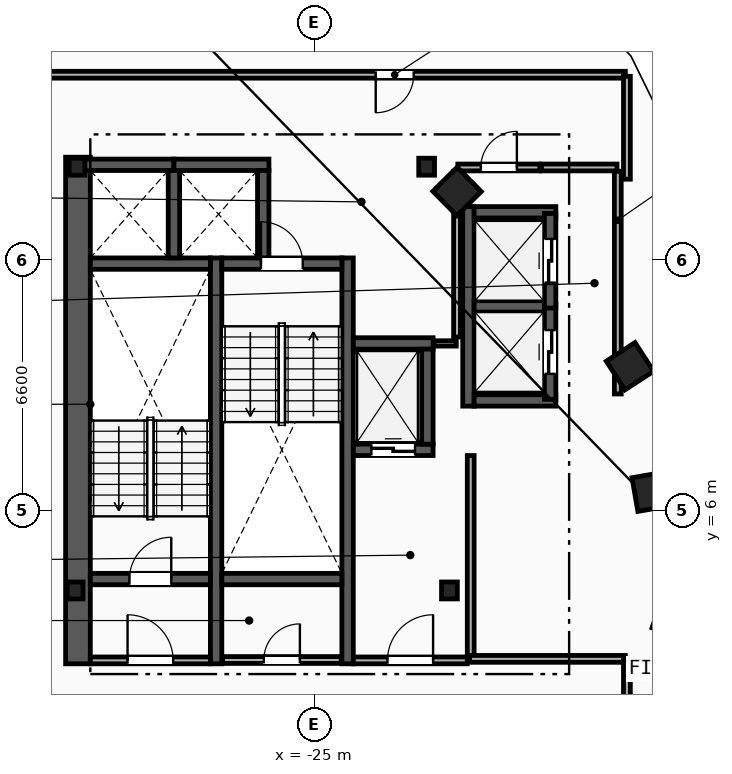
"""IFC4 building model, lengths in metres.
Left out: names, types, materials, properties, quantities, classifications, styles, units other than length and angle.
Written with IfcOpenShell. Run it as: python <this file> out.ifc"""

import sys

from ifc_helpers import new_model, si_unit, direction, frame, frame_2d, origin, origin_2d, place, context, subcontext, project, spatial, rectangle, i_section, extrude, element, fill, save


model = new_model("IFC4")
c1 = context("Model", 3, precision=1e-05, world=origin(), true_north=direction((0.0, 1.0)))
c2 = subcontext(c1, "Body", "Model", "MODEL_VIEW")
j1 = project(units=[si_unit("LENGTHUNIT", "METRE"), si_unit("PLANEANGLEUNIT", "RADIAN")], contexts=[c1])
p1 = place(None, origin())
s1 = spatial("IfcSite", under=j1, at=p1, CompositionType="ELEMENT")
p2 = place(p1, origin())
s2 = spatial("IfcBuilding", under=s1, at=p2, CompositionType="ELEMENT")
p3 = place(p2, frame((0.0, 0.0, 217.0)))
s3 = spatial("IfcBuildingStorey", under=s2, at=p3, CompositionType="ELEMENT", Elevation=217.0)
for number, where, z_axis, x_axis in (
    (1, (-31.3, 3.9, 0.0), (0.0, 0.0, 1.0), (1.0, 0.0, 0.0)),
    (2, (-21.45, 3.9, 0.0), (0.0, 0.0, 1.0), (1.0, 0.0, 0.0)),
    (3, (-22.05, 15.05, 0.0), (0.0, 0.0, 1.0), (1.0, 0.0, 0.0)),
    (4, (-31.25, 15.05, 0.0), (0.0, 0.0, 1.0), (1.0, 0.0, 0.0)),
):
    element("IfcColumn", number, at=place(p3, frame(where, z_axis=z_axis, x_axis=x_axis)), inside=s3, PredefinedType="COLUMN", context=c2, shape_type="SweptSolid", body=[
        extrude(i_section(OverallWidth=0.416, OverallDepth=0.446, WebThickness=0.039, FlangeThickness=0.063, FilletRadius=0.018, at=origin_2d()), origin(), (0.0, 0.0, 1.0), 3.6),
    ])
for number, where, z_axis, x_axis in (
    (5, (-15.55, 3.2, 0.0), (0.0, 0.0, 1.0), (0.315, 0.949, 0.0)),
    (6, (-16.125, 6.5, 0.0), (0.0, 0.0, 1.0), (-0.172, 0.985, 0.0)),
    (7, (-16.7, 9.8, 0.0), (0.0, 0.0, 1.0), (-0.544, 0.839, 0.0)),
    (8, (-21.25, 14.4, 0.0), (0.0, 0.0, 1.0), (-0.703, 0.711, 0.0)),
):
    element("IfcColumn", number, at=place(p3, frame(where, z_axis=z_axis, x_axis=x_axis)), inside=s3, PredefinedType="COLUMN", context=c2, shape_type="SweptSolid", body=[
        extrude(rectangle(XDim=0.9, YDim=0.9, at=origin_2d()), origin(), (0.0, 0.0, 1.0), 3.6),
    ])
p4 = place(p3, frame((-31.225, 1.97, 0.0), z_axis=(0.0, 0.0, 1.0), x_axis=(0.0, 1.0, 0.0)))
e9 = element("IfcWall", 9, at=p4, inside=s3, PredefinedType="SHEAR", context=c2, shape_type="SweptSolid", body=[
    extrude(rectangle(XDim=13.33, YDim=0.65, at=frame_2d((6.665, 0.0))), origin(), (0.0, 0.0, 1.0), 3.34),
])
for number, where, z_axis, x_axis in (
    (10, (-27.59, 1.97, 0.0), (0.0, 0.0, 1.0), (0.0, 1.0, 0.0)),
    (11, (-24.13, 1.97, 0.0), (0.0, 0.0, 1.0), (0.0, 1.0, 0.0)),
):
    element("IfcWall", number, at=place(p3, frame(where, z_axis=z_axis, x_axis=x_axis)), inside=s3, PredefinedType="SHEAR", context=c2, shape_type="SweptSolid", body=[
        extrude(rectangle(XDim=10.68, YDim=0.3, at=frame_2d((5.34, 0.0))), origin(), (0.0, 0.0, 1.0), 3.34),
    ])
p5 = place(p3, frame((-30.9, 4.2, 0.0), z_axis=(0.0, 0.0, 1.0), x_axis=(1.0, 0.0, 0.0)))
e12 = element("IfcWall", 12, at=p5, inside=s3, PredefinedType="SHEAR", context=c2, shape_type="SweptSolid", body=[
    extrude(rectangle(XDim=3.16, YDim=0.3, at=frame_2d((1.58, 0.0))), origin(), (0.0, 0.0, 1.0), 3.34),
])
p6 = place(p5, frame((1.03, 0.0, 0.0)))
e13 = element("IfcOpeningElement", 13, at=p6, cuts=e12, PredefinedType="OPENING", context=c2, shape_type="SweptSolid", body=[
    extrude(rectangle(XDim=1.1, YDim=2.15, at=frame_2d((0.55, 1.075))), frame((0.0, 0.16, 0.0), z_axis=(0.0, -1.0, 0.0), x_axis=(1.0, 0.0, 0.0)), (0.0, 0.0, 1.0), 0.32),
])
p7 = place(p3, frame((-30.9, 12.5, 0.0), z_axis=(0.0, 0.0, 1.0), x_axis=(1.0, 0.0, 0.0)))
e14 = element("IfcWall", 14, at=p7, inside=s3, PredefinedType="SHEAR", context=c2, shape_type="SweptSolid", body=[
    extrude(rectangle(XDim=3.16, YDim=0.3, at=frame_2d((1.58, 0.0))), origin(), (0.0, 0.0, 1.0), 3.34),
])
p8 = place(p3, frame((-27.44, 12.5, 0.0), z_axis=(0.0, 0.0, 1.0), x_axis=(1.0, 0.0, 0.0)))
e15 = element("IfcWall", 15, at=p8, inside=s3, PredefinedType="SHEAR", context=c2, shape_type="SweptSolid", body=[
    extrude(rectangle(XDim=3.16, YDim=0.3, at=frame_2d((1.58, 0.0))), origin(), (0.0, 0.0, 1.0), 3.34),
])
p9 = place(p8, frame((1.03, 0.0, 0.0)))
e16 = element("IfcOpeningElement", 16, at=p9, cuts=e15, PredefinedType="OPENING", context=c2, shape_type="SweptSolid", body=[
    extrude(rectangle(XDim=1.1, YDim=2.15, at=frame_2d((0.55, 1.075))), frame((0.0, 0.16, 0.0), z_axis=(0.0, -1.0, 0.0), x_axis=(1.0, 0.0, 0.0)), (0.0, 0.0, 1.0), 0.32),
])
p10 = place(p3, frame((-27.44, 4.2, 0.0), z_axis=(0.0, 0.0, 1.0), x_axis=(1.0, 0.0, 0.0)))
e17 = element("IfcWall", 17, at=p10, inside=s3, PredefinedType="SHEAR", context=c2, shape_type="SweptSolid", body=[
    extrude(rectangle(XDim=3.16, YDim=0.3, at=frame_2d((1.58, 0.0))), origin(), (0.0, 0.0, 1.0), 3.34),
])
p11 = place(p3, frame((-20.89, 2.15, 0.0), z_axis=(0.0, 0.0, 1.0), x_axis=(0.0, 1.0, 0.0)))
e18 = element("IfcWall", 18, at=p11, inside=s3, PredefinedType="PARTITIONING", context=c2, shape_type="SweptSolid", body=[
    extrude(rectangle(XDim=5.3, YDim=0.18, at=frame_2d((2.65, 0.0))), origin(), (0.0, 0.0, 1.0), 3.34),
])
p12 = place(p3, frame((-23.98, 2.06, 0.0), z_axis=(0.0, 0.0, 1.0), x_axis=(1.0, 0.0, 0.0)))
e19 = element("IfcWall", 19, at=p12, inside=s3, PredefinedType="PARTITIONING", context=c2, shape_type="SweptSolid", body=[
    extrude(rectangle(XDim=3.0, YDim=0.18, at=frame_2d((1.5, 0.0))), origin(), (0.0, 0.0, 1.0), 3.34),
])
p13 = place(p12, frame((0.9, 0.0, 0.0)))
e20 = element("IfcOpeningElement", 20, at=p13, cuts=e19, PredefinedType="OPENING", context=c2, shape_type="SweptSolid", body=[
    extrude(rectangle(XDim=1.2, YDim=2.15, at=frame_2d((0.6, 1.075))), frame((0.0, 0.1, 0.0), z_axis=(0.0, -1.0, 0.0), x_axis=(1.0, 0.0, 0.0)), (0.0, 0.0, 1.0), 0.2),
])
p14 = place(p3, frame((-30.9, 2.06, 0.0), z_axis=(0.0, 0.0, 1.0), x_axis=(1.0, 0.0, 0.0)))
e21 = element("IfcWall", 21, at=p14, inside=s3, PredefinedType="PARTITIONING", context=c2, shape_type="SweptSolid", body=[
    extrude(rectangle(XDim=3.16, YDim=0.18, at=frame_2d((1.58, 0.0))), origin(), (0.0, 0.0, 1.0), 3.34),
])
p15 = place(p14, frame((0.98, 0.0, 0.0)))
e22 = element("IfcOpeningElement", 22, at=p15, cuts=e21, PredefinedType="OPENING", context=c2, shape_type="SweptSolid", body=[
    extrude(rectangle(XDim=1.2, YDim=2.15, at=frame_2d((0.6, 1.075))), frame((0.0, 0.1, 0.0), z_axis=(0.0, -1.0, 0.0), x_axis=(1.0, 0.0, 0.0)), (0.0, 0.0, 1.0), 0.2),
])
p16 = place(p3, frame((-23.98, 7.6, 0.0), z_axis=(0.0, 0.0, 1.0), x_axis=(1.0, 0.0, 0.0)))
e23 = element("IfcWall", 23, at=p16, inside=s3, PredefinedType="SHEAR", context=c2, shape_type="SweptSolid", body=[
    extrude(rectangle(XDim=2.1, YDim=0.3, at=frame_2d((1.05, 0.0))), origin(), (0.0, 0.0, 1.0), 3.34),
])
p17 = place(p16, frame((0.475, 0.0, 0.0)))
e24 = element("IfcOpeningElement", 24, at=p17, cuts=e23, PredefinedType="OPENING", context=c2, shape_type="SweptSolid", body=[
    extrude(rectangle(XDim=1.15, YDim=2.2, at=frame_2d((0.575, 1.1))), frame((0.0, 0.16, 0.0), z_axis=(0.0, -1.0, 0.0), x_axis=(1.0, 0.0, 0.0)), (0.0, 0.0, 1.0), 0.32),
])
p18 = place(p3, frame((-23.98, 10.4, 0.0), z_axis=(0.0, 0.0, 1.0), x_axis=(1.0, 0.0, 0.0)))
e25 = element("IfcWall", 25, at=p18, inside=s3, PredefinedType="SHEAR", context=c2, shape_type="SweptSolid", body=[
    extrude(rectangle(XDim=2.1, YDim=0.3, at=frame_2d((1.05, 0.0))), origin(), (0.0, 0.0, 1.0), 3.34),
])
for number, where, z_axis, x_axis in (
    (26, (-22.03, 7.75, 0.0), (0.0, 0.0, 1.0), (0.0, 1.0, 0.0)),
    (27, (-31.2, 15.1, 0.0), (0.0, 0.0, 1.0), (1.0, 0.0, 0.0)),
):
    element("IfcWall", number, at=place(p3, frame(where, z_axis=z_axis, x_axis=x_axis)), inside=s3, PredefinedType="SHEAR", context=c2, shape_type="SweptSolid", body=[
        extrude(rectangle(XDim=2.5, YDim=0.3, at=frame_2d((1.25, 0.0))), origin(), (0.0, 0.0, 1.0), 3.34),
    ])
p19 = place(p3, frame((-28.7, 12.65, 0.0), z_axis=(0.0, 0.0, 1.0), x_axis=(0.0, 1.0, 0.0)))
e28 = element("IfcWall", 28, at=p19, inside=s3, PredefinedType="SHEAR", context=c2, shape_type="SweptSolid", body=[
    extrude(rectangle(XDim=2.3, YDim=0.3, at=frame_2d((1.15, 0.0))), origin(), (0.0, 0.0, 1.0), 3.34),
])
p20 = place(p3, frame((-28.7, 15.1, 0.0), z_axis=(0.0, 0.0, 1.0), x_axis=(1.0, 0.0, 0.0)))
e29 = element("IfcWall", 29, at=p20, inside=s3, PredefinedType="SHEAR", context=c2, shape_type="SweptSolid", body=[
    extrude(rectangle(XDim=2.5, YDim=0.3, at=frame_2d((1.25, 0.0))), origin(), (0.0, 0.0, 1.0), 3.34),
])
p21 = place(p3, frame((-26.35, 12.65, 0.0), z_axis=(0.0, 0.0, 1.0), x_axis=(0.0, 1.0, 0.0)))
e30 = element("IfcWall", 30, at=p21, inside=s3, PredefinedType="SHEAR", context=c2, shape_type="SweptSolid", body=[
    extrude(rectangle(XDim=2.3, YDim=0.3, at=frame_2d((1.15, 0.0))), origin(), (0.0, 0.0, 1.0), 3.34),
])
p22 = place(p3, frame((-20.95, 8.75, 0.0), z_axis=(0.0, 0.0, 1.0), x_axis=(0.0, 1.0, 0.0)))
e31 = element("IfcWall", 31, at=p22, inside=s3, PredefinedType="SHEAR", context=c2, shape_type="SweptSolid", body=[
    extrude(rectangle(XDim=5.25, YDim=0.3, at=frame_2d((2.625, 0.0))), origin(), (0.0, 0.0, 1.0), 3.34),
])
for number, where, z_axis, x_axis in (
    (32, (-20.8, 8.9, 0.0), (0.0, 0.0, 1.0), (1.0, 0.0, 0.0)),
    (33, (-20.8, 13.85, 0.0), (0.0, 0.0, 1.0), (1.0, 0.0, 0.0)),
):
    element("IfcWall", number, at=place(p3, frame(where, z_axis=z_axis, x_axis=x_axis)), inside=s3, PredefinedType="SHEAR", context=c2, shape_type="SweptSolid", body=[
        extrude(rectangle(XDim=2.15, YDim=0.3, at=frame_2d((1.075, 0.0))), origin(), (0.0, 0.0, 1.0), 3.34),
    ])
p23 = place(p3, frame((-20.8, 11.375, 0.0), z_axis=(0.0, 0.0, 1.0), x_axis=(1.0, 0.0, 0.0)))
e34 = element("IfcWall", 34, at=p23, inside=s3, PredefinedType="SHEAR", context=c2, shape_type="SweptSolid", body=[
    extrude(rectangle(XDim=1.85, YDim=0.3, at=frame_2d((0.925, 0.0))), origin(), (0.0, 0.0, 1.0), 3.34),
])
p24 = place(p3, frame((-18.8, 8.93, 0.0), z_axis=(0.0, 0.0, 1.0), x_axis=(0.0, 1.0, 0.0)))
e35 = element("IfcWall", 35, at=p24, inside=s3, PredefinedType="SHEAR", context=c2, shape_type="SweptSolid", body=[
    extrude(rectangle(XDim=2.49, YDim=0.3, at=frame_2d((1.245, 0.0))), origin(), (0.0, 0.0, 1.0), 3.34),
])
p25 = place(p24, frame((0.67, 0.0, 0.0)))
e36 = element("IfcOpeningElement", 36, at=p25, cuts=e35, PredefinedType="OPENING", context=c2, shape_type="SweptSolid", body=[
    extrude(rectangle(XDim=1.15, YDim=2.2, at=frame_2d((0.575, 1.1))), frame((0.0, 0.16, 0.0), z_axis=(0.0, -1.0, 0.0), x_axis=(1.0, 0.0, 0.0)), (0.0, 0.0, 1.0), 0.32),
])
p26 = place(p3, frame((-18.8, 11.33, 0.0), z_axis=(0.0, 0.0, 1.0), x_axis=(0.0, 1.0, 0.0)))
e37 = element("IfcWall", 37, at=p26, inside=s3, PredefinedType="SHEAR", context=c2, shape_type="SweptSolid", body=[
    extrude(rectangle(XDim=2.49, YDim=0.3, at=frame_2d((1.245, 0.0))), origin(), (0.0, 0.0, 1.0), 3.34),
])
p27 = place(p26, frame((0.67, 0.0, 0.0)))
e38 = element("IfcOpeningElement", 38, at=p27, cuts=e37, PredefinedType="OPENING", context=c2, shape_type="SweptSolid", body=[
    extrude(rectangle(XDim=1.15, YDim=2.2, at=frame_2d((0.575, 1.1))), frame((0.0, 0.16, 0.0), z_axis=(0.0, -1.0, 0.0), x_axis=(1.0, 0.0, 0.0)), (0.0, 0.0, 1.0), 0.32),
])
p28 = place(p3, frame((-17.02, 9.07, 0.0), z_axis=(0.0, 0.0, 1.0), x_axis=(0.0, 1.0, 0.0)))
e39 = element("IfcWall", 39, at=p28, inside=s3, PredefinedType="PARTITIONING", context=c2, shape_type="SweptSolid", body=[
    extrude(rectangle(XDim=5.86, YDim=0.18, at=frame_2d((2.93, 0.0))), origin(), (0.0, 0.0, 1.0), 3.34),
])
p29 = place(p3, frame((-21.23, 15.03, 0.0), z_axis=(0.0, 0.0, 1.0), x_axis=(1.0, 0.0, 0.0)))
e40 = element("IfcWall", 40, at=p29, inside=s3, PredefinedType="PARTITIONING", context=c2, shape_type="SweptSolid", body=[
    extrude(rectangle(XDim=2.16, YDim=0.18, at=frame_2d((1.08, 0.0))), origin(), (0.0, 0.0, 1.0), 3.34),
])
p30 = place(p29, frame((0.605, 0.0, 0.0)))
e41 = element("IfcOpeningElement", 41, at=p30, cuts=e40, PredefinedType="OPENING", context=c2, shape_type="SweptSolid", body=[
    extrude(rectangle(XDim=0.95, YDim=2.1, at=frame_2d((0.475, 1.05))), frame((0.0, 0.1, 0.0), z_axis=(0.0, -1.0, 0.0), x_axis=(1.0, 0.0, 0.0)), (0.0, 0.0, 1.0), 0.2),
])
p31 = place(p3, frame((-19.03, 15.03, 0.0), z_axis=(0.0, 0.0, 1.0), x_axis=(1.0, 0.0, 0.0)))
e42 = element("IfcWall", 42, at=p31, inside=s3, PredefinedType="PARTITIONING", context=c2, shape_type="SweptSolid", body=[
    extrude(rectangle(XDim=1.99, YDim=0.18, at=frame_2d((0.995, 0.0))), origin(), (0.0, 0.0, 1.0), 3.34),
])
p32 = place(p3, frame((-21.86, 10.4, 0.0), z_axis=(0.0, 0.0, 1.0), x_axis=(1.0, 0.0, 0.0)))
e43 = element("IfcWall", 43, at=p32, inside=s3, PredefinedType="PARTITIONING", context=c2, shape_type="SweptSolid", body=[
    extrude(rectangle(XDim=0.59, YDim=0.14, at=frame_2d((0.295, 0.0))), origin(), (0.0, 0.0, 1.0), 3.34),
])
p33 = place(p3, frame((-21.25, 10.57, 0.0), z_axis=(0.0, 0.0, 1.0), x_axis=(0.0, 1.0, 0.0)))
e44 = element("IfcWall", 44, at=p33, inside=s3, PredefinedType="PARTITIONING", context=c2, shape_type="SweptSolid", body=[
    extrude(rectangle(XDim=4.36, YDim=0.18, at=frame_2d((2.18, 0.0))), origin(), (0.0, 0.0, 1.0), 3.34),
])
p34 = place(p3, frame((-27.42, 2.07, 0.0), z_axis=(0.0, 0.0, 1.0), x_axis=(1.0, 0.0, 0.0)))
e45 = element("IfcWall", 45, at=p34, inside=s3, PredefinedType="PARTITIONING", context=c2, shape_type="SweptSolid", body=[
    extrude(rectangle(XDim=3.12, YDim=0.18, at=frame_2d((1.56, 0.0))), origin(), (0.0, 0.0, 1.0), 3.34),
])
p35 = place(p34, frame((1.085, 0.0, 0.0)))
e46 = element("IfcOpeningElement", 46, at=p35, cuts=e45, PredefinedType="OPENING", context=c2, shape_type="SweptSolid", body=[
    extrude(rectangle(XDim=0.95, YDim=2.1, at=frame_2d((0.475, 1.05))), frame((0.0, 0.1, 0.0), z_axis=(0.0, -1.0, 0.0), x_axis=(1.0, 0.0, 0.0)), (0.0, 0.0, 1.0), 0.2),
])
p36 = place(p3, frame((-16.822, 17.47, 0.0), z_axis=(0.0, 0.0, 1.0), x_axis=(-1.0, 0.0, 0.0)))
e47 = element("IfcWall", 47, at=p36, inside=s3, PredefinedType="PARTITIONING", context=c2, shape_type="SweptSolid", body=[
    extrude(rectangle(XDim=16.807, YDim=0.18, at=frame_2d((8.403, 0.0))), origin(), (0.0, 0.0, 1.0), 3.34),
])
p37 = place(p36, frame((5.569, 0.0, 0.0)))
e48 = element("IfcOpeningElement", 48, at=p37, cuts=e47, PredefinedType="OPENING", context=c2, shape_type="SweptSolid", body=[
    extrude(rectangle(XDim=1.0, YDim=2.15, at=frame_2d((0.5, 1.075))), frame((0.0, 0.1, 0.0), z_axis=(0.0, -1.0, 0.0), x_axis=(1.0, 0.0, 0.0)), (0.0, 0.0, 1.0), 0.2),
])
p38 = place(p3, frame((-16.822, 2.1, 0.0), z_axis=(0.0, 0.0, 1.0), x_axis=(-1.0, 0.0, 0.0)))
e49 = element("IfcWall", 49, at=p38, inside=s3, PredefinedType="PARTITIONING", context=c2, shape_type="SweptSolid", body=[
    extrude(rectangle(XDim=4.098, YDim=0.18, at=frame_2d((2.049, 0.0))), origin(), (0.0, 0.0, 1.0), 3.34),
])
p39 = place(p3, frame((-16.78, 14.721, 0.0), z_axis=(0.0, 0.0, 1.0), x_axis=(0.0, 1.0, 0.0)))
e50 = element("IfcWall", 50, at=p39, inside=s3, PredefinedType="PARTITIONING", context=c2, shape_type="SweptSolid", body=[
    extrude(rectangle(XDim=2.707, YDim=0.18, at=frame_2d((1.354, 0.0))), origin(), (0.0, 0.0, 1.0), 3.34),
])
p40 = place(p3, frame((-16.78, -0.329, 0.0), z_axis=(0.0, 0.0, 1.0), x_axis=(0.0, 1.0, 0.0)))
e51 = element("IfcWall", 51, at=p40, inside=s3, PredefinedType="PARTITIONING", context=c2, shape_type="SweptSolid", body=[
    extrude(rectangle(XDim=2.387, YDim=0.18, at=frame_2d((1.194, 0.0))), origin(), (0.0, 0.0, 1.0), 3.34),
])
p41 = place(p6, origin())
e52 = element("IfcDoor", 52, at=p41, inside=s3, OperationType="SINGLE_SWING_RIGHT", PredefinedType="DOOR", context=c2, shape_type="SweptSolid", body=[
    extrude(rectangle(XDim=1.1, YDim=2.15, at=frame_2d((0.55, 1.075))), frame((0.0, 0.025, 0.0), z_axis=(0.0, -1.0, 0.0), x_axis=(1.0, 0.0, 0.0)), (0.0, 0.0, 1.0), 0.05),
])
fill(e13, e52)
p42 = place(p9, origin())
e53 = element("IfcDoor", 53, at=p42, inside=s3, OperationType="SINGLE_SWING_LEFT", PredefinedType="DOOR", context=c2, shape_type="SweptSolid", body=[
    extrude(rectangle(XDim=1.1, YDim=2.15, at=frame_2d((0.55, 1.075))), frame((0.0, 0.025, 0.0), z_axis=(0.0, -1.0, 0.0), x_axis=(1.0, 0.0, 0.0)), (0.0, 0.0, 1.0), 0.05),
])
fill(e16, e53)
p43 = place(p13, origin())
e54 = element("IfcDoor", 54, at=p43, inside=s3, OperationType="SINGLE_SWING_RIGHT", PredefinedType="DOOR", context=c2, shape_type="SweptSolid", body=[
    extrude(rectangle(XDim=1.2, YDim=2.15, at=frame_2d((0.6, 1.075))), frame((0.0, 0.025, 0.0), z_axis=(0.0, -1.0, 0.0), x_axis=(1.0, 0.0, 0.0)), (0.0, 0.0, 1.0), 0.05),
])
fill(e20, e54)
p44 = place(p15, origin())
e55 = element("IfcDoor", 55, at=p44, inside=s3, OperationType="SINGLE_SWING_LEFT", PredefinedType="DOOR", context=c2, shape_type="SweptSolid", body=[
    extrude(rectangle(XDim=1.2, YDim=2.15, at=frame_2d((0.6, 1.075))), frame((0.0, 0.025, 0.0), z_axis=(0.0, -1.0, 0.0), x_axis=(1.0, 0.0, 0.0)), (0.0, 0.0, 1.0), 0.05),
])
fill(e22, e55)
p45 = place(p17, origin())
e56 = element("IfcDoor", 56, at=p45, inside=s3, OperationType="SLIDING_TO_LEFT", PredefinedType="TRAPDOOR", context=c2, shape_type="SweptSolid", body=[
    extrude(rectangle(XDim=1.15, YDim=2.2, at=frame_2d((0.575, 1.1))), frame((0.0, 0.025, 0.0), z_axis=(0.0, -1.0, 0.0), x_axis=(1.0, 0.0, 0.0)), (0.0, 0.0, 1.0), 0.05),
])
fill(e24, e56)
p46 = place(p25, origin())
e57 = element("IfcDoor", 57, at=p46, inside=s3, OperationType="SLIDING_TO_LEFT", PredefinedType="TRAPDOOR", context=c2, shape_type="SweptSolid", body=[
    extrude(rectangle(XDim=1.15, YDim=2.2, at=frame_2d((0.575, 1.1))), frame((0.0, 0.025, 0.0), z_axis=(0.0, -1.0, 0.0), x_axis=(1.0, 0.0, 0.0)), (0.0, 0.0, 1.0), 0.05),
])
fill(e36, e57)
p47 = place(p27, origin())
e58 = element("IfcDoor", 58, at=p47, inside=s3, OperationType="SLIDING_TO_LEFT", PredefinedType="TRAPDOOR", context=c2, shape_type="SweptSolid", body=[
    extrude(rectangle(XDim=1.15, YDim=2.2, at=frame_2d((0.575, 1.1))), frame((0.0, 0.025, 0.0), z_axis=(0.0, -1.0, 0.0), x_axis=(1.0, 0.0, 0.0)), (0.0, 0.0, 1.0), 0.05),
])
fill(e38, e58)
p48 = place(p37, origin())
e59 = element("IfcDoor", 59, at=p48, inside=s3, OperationType="SINGLE_SWING_RIGHT", PredefinedType="DOOR", context=c2, shape_type="SweptSolid", body=[
    extrude(rectangle(XDim=1.0, YDim=2.15, at=frame_2d((0.5, 1.075))), frame((0.0, 0.025, 0.0), z_axis=(0.0, -1.0, 0.0), x_axis=(1.0, 0.0, 0.0)), (0.0, 0.0, 1.0), 0.05),
])
fill(e48, e59)
p49 = place(p35, origin())
e60 = element("IfcDoor", 60, at=p49, inside=s3, OperationType="SINGLE_SWING_RIGHT", PredefinedType="DOOR", context=c2, shape_type="SweptSolid", body=[
    extrude(rectangle(XDim=0.95, YDim=2.1, at=frame_2d((0.475, 1.05))), frame((0.0, 0.025, 0.0), z_axis=(0.0, -1.0, 0.0), x_axis=(1.0, 0.0, 0.0)), (0.0, 0.0, 1.0), 0.05),
])
fill(e46, e60)
p50 = place(p30, origin())
e61 = element("IfcDoor", 61, at=p50, inside=s3, OperationType="SINGLE_SWING_RIGHT", PredefinedType="DOOR", context=c2, shape_type="SweptSolid", body=[
    extrude(rectangle(XDim=0.95, YDim=2.1, at=frame_2d((0.475, 1.05))), frame((0.0, 0.025, 0.0), z_axis=(0.0, -1.0, 0.0), x_axis=(1.0, 0.0, 0.0)), (0.0, 0.0, 1.0), 0.05),
])
fill(e41, e61)
save(model, sys.argv[1])
